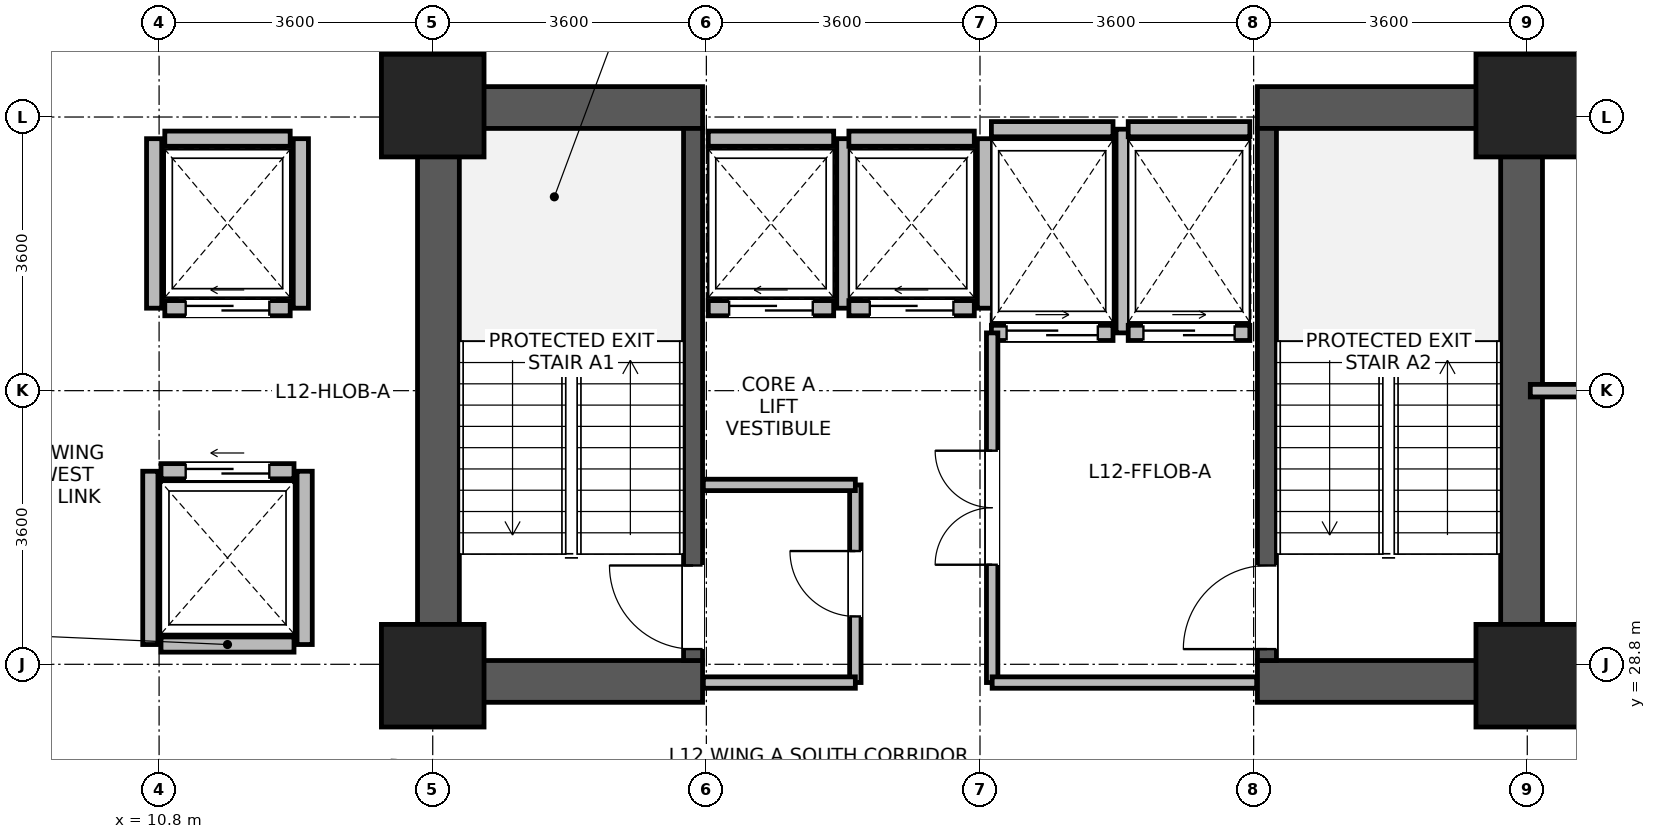
"""IFC4 building model, lengths in metres.
Left out: names, types, materials, properties, quantities, classifications, styles, units other than length and angle.
Written with IfcOpenShell. Run it as: python <this file> out.ifc"""

import sys

from ifc_helpers import new_model, si_unit, direction, frame, frame_2d, origin, origin_2d, place, context, subcontext, project, spatial, rectangle, extrude, source, transform, mapped, element, fill, save


model = new_model("IFC4")
c1 = context("Model", 3, precision=1e-05, world=origin(), true_north=direction((0.0, 1.0)))
c2 = subcontext(c1, "Body", "Model", "MODEL_VIEW")
j1 = project(units=[si_unit("LENGTHUNIT", "METRE"), si_unit("PLANEANGLEUNIT", "RADIAN")], contexts=[c1])
p1 = place(None, origin())
s1 = spatial("IfcSite", under=j1, at=p1, CompositionType="ELEMENT")
p2 = place(p1, origin())
s2 = spatial("IfcBuilding", under=s1, at=p2, CompositionType="ELEMENT")
p3 = place(p2, frame((0.0, 0.0, 51.2)))
s3 = spatial("IfcBuildingStorey", under=s2, at=p3, CompositionType="ELEMENT", Elevation=51.2)
for number, where, z_axis, x_axis in (
    (1, (14.475, 28.3, 0.0), (0.0, 0.0, 1.0), (0.0, 1.0, 0.0)),
    (2, (28.725, 28.3, 0.0), (0.0, 0.0, 1.0), (0.0, 1.0, 0.0)),
):
    element("IfcWall", number, at=place(p3, frame(where, z_axis=z_axis, x_axis=x_axis)), inside=s3, PredefinedType="SHEAR", context=c2, shape_type="SweptSolid", body=[
        extrude(rectangle(XDim=8.1, YDim=0.55, at=frame_2d((4.05, 0.0))), origin(), (0.0, 0.0, 1.0), 3.45),
    ])
for number, where, z_axis, x_axis in (
    (3, (14.75, 28.575, 0.0), (0.0, 0.0, 1.0), (1.0, 0.0, 0.0)),
    (4, (25.25, 28.575, 0.0), (0.0, 0.0, 1.0), (1.0, 0.0, 0.0)),
    (5, (14.75, 36.125, 0.0), (0.0, 0.0, 1.0), (1.0, 0.0, 0.0)),
    (6, (25.25, 36.125, 0.0), (0.0, 0.0, 1.0), (1.0, 0.0, 0.0)),
):
    element("IfcWall", number, at=place(p3, frame(where, z_axis=z_axis, x_axis=x_axis)), inside=s3, PredefinedType="SHEAR", context=c2, shape_type="SweptSolid", body=[
        extrude(rectangle(XDim=3.2, YDim=0.55, at=frame_2d((1.6, 0.0))), origin(), (0.0, 0.0, 1.0), 3.45),
    ])
p4 = place(p3, frame((17.825, 28.85, 0.0), z_axis=(0.0, 0.0, 1.0), x_axis=(0.0, 1.0, 0.0)))
e7 = element("IfcWall", 7, at=p4, inside=s3, PredefinedType="SHEAR", context=c2, shape_type="SweptSolid", body=[
    extrude(rectangle(XDim=7.0, YDim=0.25, at=frame_2d((3.5, 0.0))), origin(), (0.0, 0.0, 1.0), 3.45),
])
p5 = place(p4, frame((0.15, 0.0, 0.0)))
e8 = element("IfcOpeningElement", 8, at=p5, cuts=e7, PredefinedType="OPENING", context=c2, shape_type="SweptSolid", body=[
    extrude(rectangle(XDim=1.1, YDim=2.08, at=frame_2d((0.55, 1.04))), frame((0.0, 0.135, 0.0), z_axis=(0.0, -1.0, 0.0), x_axis=(1.0, 0.0, 0.0)), (0.0, 0.0, 1.0), 0.27),
])
p6 = place(p3, frame((25.375, 28.85, 0.0), z_axis=(0.0, 0.0, 1.0), x_axis=(0.0, 1.0, 0.0)))
e9 = element("IfcWall", 9, at=p6, inside=s3, PredefinedType="SHEAR", context=c2, shape_type="SweptSolid", body=[
    extrude(rectangle(XDim=7.0, YDim=0.25, at=frame_2d((3.5, 0.0))), origin(), (0.0, 0.0, 1.0), 3.45),
])
p7 = place(p6, frame((0.15, 0.0, 0.0)))
e10 = element("IfcOpeningElement", 10, at=p7, cuts=e9, PredefinedType="OPENING", context=c2, shape_type="SweptSolid", body=[
    extrude(rectangle(XDim=1.1, YDim=2.08, at=frame_2d((0.55, 1.04))), frame((0.0, 0.135, 0.0), z_axis=(0.0, -1.0, 0.0), x_axis=(1.0, 0.0, 0.0)), (0.0, 0.0, 1.0), 0.27),
])
m1 = source(origin(), c2, "Body", "SweptSolid", [
    extrude(rectangle(XDim=1.35, YDim=1.35, at=origin_2d()), origin(), (0.0, 0.0, 1.0), 3.7),
])
for number, where, z_axis, x_axis in (
    (11, (14.4, 28.65, 0.0), (0.0, 0.0, 1.0), (1.0, 0.0, 0.0)),
    (12, (14.4, 36.15, 0.0), (0.0, 0.0, 1.0), (1.0, 0.0, 0.0)),
    (13, (28.8, 28.65, 0.0), (0.0, 0.0, 1.0), (1.0, 0.0, 0.0)),
    (14, (28.8, 36.15, 0.0), (0.0, 0.0, 1.0), (1.0, 0.0, 0.0)),
):
    element("IfcColumn", number, at=place(p3, frame(where, z_axis=z_axis, x_axis=x_axis)), inside=s3, PredefinedType="COLUMN", context=c2, shape_type="MappedRepresentation", body=[
        mapped(m1, transform((0.0, 0.0, 0.0), x_axis=(1.0, 0.0, 0.0), y_axis=(0.0, 1.0, 0.0), z_axis=(0.0, 0.0, 1.0), scale=1.0)),
    ])
p8 = place(p3, frame((18.025, 33.485, 0.0), z_axis=(0.0, 0.0, 1.0), x_axis=(1.0, 0.0, 0.0)))
e15 = element("IfcWall", 15, at=p8, inside=s3, PredefinedType="PARTITIONING", context=c2, shape_type="SweptSolid", body=[
    extrude(rectangle(XDim=1.65, YDim=0.2, at=frame_2d((0.825, 0.0))), origin(), (0.0, 0.0, 1.0), 3.43),
])
p9 = place(p8, frame((0.275, 0.0, 0.0)))
e16 = element("IfcOpeningElement", 16, at=p9, cuts=e15, PredefinedType="OPENING", context=c2, shape_type="SweptSolid", body=[
    extrude(rectangle(XDim=1.1, YDim=2.12, at=frame_2d((0.55, 1.06))), frame((0.0, 0.11, 0.0), z_axis=(0.0, -1.0, 0.0), x_axis=(1.0, 0.0, 0.0)), (0.0, 0.0, 1.0), 0.22),
])
p10 = place(p3, frame((18.025, 35.715, 0.0), z_axis=(0.0, 0.0, 1.0), x_axis=(1.0, 0.0, 0.0)))
e17 = element("IfcWall", 17, at=p10, inside=s3, PredefinedType="PARTITIONING", context=c2, shape_type="SweptSolid", body=[
    extrude(rectangle(XDim=1.65, YDim=0.2, at=frame_2d((0.825, 0.0))), origin(), (0.0, 0.0, 1.0), 2.23),
])
p11 = place(p3, frame((19.815, 33.485, 0.0), z_axis=(0.0, 0.0, 1.0), x_axis=(0.0, 1.0, 0.0)))
e18 = element("IfcWall", 18, at=p11, inside=s3, PredefinedType="PARTITIONING", context=c2, shape_type="SweptSolid", body=[
    extrude(rectangle(XDim=2.23, YDim=0.2, at=frame_2d((1.115, 0.0))), origin(), (0.0, 0.0, 1.0), 3.43),
])
p12 = place(p3, frame((19.875, 33.485, 0.0), z_axis=(0.0, 0.0, 1.0), x_axis=(1.0, 0.0, 0.0)))
e19 = element("IfcWall", 19, at=p12, inside=s3, PredefinedType="PARTITIONING", context=c2, shape_type="SweptSolid", body=[
    extrude(rectangle(XDim=1.65, YDim=0.2, at=frame_2d((0.825, 0.0))), origin(), (0.0, 0.0, 1.0), 3.43),
])
p13 = place(p12, frame((0.275, 0.0, 0.0)))
e20 = element("IfcOpeningElement", 20, at=p13, cuts=e19, PredefinedType="OPENING", context=c2, shape_type="SweptSolid", body=[
    extrude(rectangle(XDim=1.1, YDim=2.12, at=frame_2d((0.55, 1.06))), frame((0.0, 0.11, 0.0), z_axis=(0.0, -1.0, 0.0), x_axis=(1.0, 0.0, 0.0)), (0.0, 0.0, 1.0), 0.22),
])
p14 = place(p3, frame((19.875, 35.715, 0.0), z_axis=(0.0, 0.0, 1.0), x_axis=(1.0, 0.0, 0.0)))
e21 = element("IfcWall", 21, at=p14, inside=s3, PredefinedType="PARTITIONING", context=c2, shape_type="SweptSolid", body=[
    extrude(rectangle(XDim=1.65, YDim=0.2, at=frame_2d((0.825, 0.0))), origin(), (0.0, 0.0, 1.0), 2.23),
])
p15 = place(p3, frame((21.665, 33.485, 0.0), z_axis=(0.0, 0.0, 1.0), x_axis=(0.0, 1.0, 0.0)))
e22 = element("IfcWall", 22, at=p15, inside=s3, PredefinedType="PARTITIONING", context=c2, shape_type="SweptSolid", body=[
    extrude(rectangle(XDim=2.23, YDim=0.2, at=frame_2d((1.115, 0.0))), origin(), (0.0, 0.0, 1.0), 3.43),
])
p16 = place(p3, frame((10.825, 29.06, 0.0), z_axis=(0.0, 0.0, 1.0), x_axis=(1.0, 0.0, 0.0)))
e23 = element("IfcWall", 23, at=p16, inside=s3, PredefinedType="PARTITIONING", context=c2, shape_type="SweptSolid", body=[
    extrude(rectangle(XDim=1.75, YDim=0.2, at=frame_2d((0.875, 0.0))), origin(), (0.0, 0.0, 1.0), 3.43),
])
p17 = place(p3, frame((10.825, 31.34, 0.0), z_axis=(0.0, 0.0, 1.0), x_axis=(1.0, 0.0, 0.0)))
e24 = element("IfcWall", 24, at=p17, inside=s3, PredefinedType="PARTITIONING", context=c2, shape_type="SweptSolid", body=[
    extrude(rectangle(XDim=1.75, YDim=0.2, at=frame_2d((0.875, 0.0))), origin(), (0.0, 0.0, 1.0), 3.43),
])
p18 = place(p17, frame((0.325, 0.0, 0.0)))
e25 = element("IfcOpeningElement", 25, at=p18, cuts=e24, PredefinedType="OPENING", context=c2, shape_type="SweptSolid", body=[
    extrude(rectangle(XDim=1.1, YDim=2.12, at=frame_2d((0.55, 1.06))), frame((0.0, 0.11, 0.0), z_axis=(0.0, -1.0, 0.0), x_axis=(1.0, 0.0, 0.0)), (0.0, 0.0, 1.0), 0.22),
])
for number, where, z_axis, x_axis in (
    (26, (10.685, 29.06, 0.0), (0.0, 0.0, 1.0), (0.0, 1.0, 0.0)),
    (27, (12.715, 29.06, 0.0), (0.0, 0.0, 1.0), (0.0, 1.0, 0.0)),
):
    element("IfcWall", number, at=place(p3, frame(where, z_axis=z_axis, x_axis=x_axis)), inside=s3, PredefinedType="PARTITIONING", context=c2, shape_type="SweptSolid", body=[
        extrude(rectangle(XDim=2.28, YDim=0.2, at=frame_2d((1.14, 0.0))), origin(), (0.0, 0.0, 1.0), 3.43),
    ])
p19 = place(p3, frame((10.875, 33.485, 0.0), z_axis=(0.0, 0.0, 1.0), x_axis=(1.0, 0.0, 0.0)))
e28 = element("IfcWall", 28, at=p19, inside=s3, PredefinedType="PARTITIONING", context=c2, shape_type="SweptSolid", body=[
    extrude(rectangle(XDim=1.65, YDim=0.2, at=frame_2d((0.825, 0.0))), origin(), (0.0, 0.0, 1.0), 3.43),
])
p20 = place(p19, frame((0.275, 0.0, 0.0)))
e29 = element("IfcOpeningElement", 29, at=p20, cuts=e28, PredefinedType="OPENING", context=c2, shape_type="SweptSolid", body=[
    extrude(rectangle(XDim=1.1, YDim=2.12, at=frame_2d((0.55, 1.06))), frame((0.0, 0.11, 0.0), z_axis=(0.0, -1.0, 0.0), x_axis=(1.0, 0.0, 0.0)), (0.0, 0.0, 1.0), 0.22),
])
p21 = place(p3, frame((10.875, 35.715, 0.0), z_axis=(0.0, 0.0, 1.0), x_axis=(1.0, 0.0, 0.0)))
e30 = element("IfcWall", 30, at=p21, inside=s3, PredefinedType="PARTITIONING", context=c2, shape_type="SweptSolid", body=[
    extrude(rectangle(XDim=1.65, YDim=0.2, at=frame_2d((0.825, 0.0))), origin(), (0.0, 0.0, 1.0), 3.43),
])
for number, where, z_axis, x_axis in (
    (31, (10.735, 33.485, 0.0), (0.0, 0.0, 1.0), (0.0, 1.0, 0.0)),
    (32, (12.665, 33.485, 0.0), (0.0, 0.0, 1.0), (0.0, 1.0, 0.0)),
):
    element("IfcWall", number, at=place(p3, frame(where, z_axis=z_axis, x_axis=x_axis)), inside=s3, PredefinedType="PARTITIONING", context=c2, shape_type="SweptSolid", body=[
        extrude(rectangle(XDim=2.23, YDim=0.2, at=frame_2d((1.115, 0.0))), origin(), (0.0, 0.0, 1.0), 3.43),
    ])
p22 = place(p3, frame((21.75, 33.16, 0.0), z_axis=(0.0, 0.0, 1.0), x_axis=(1.0, 0.0, 0.0)))
e33 = element("IfcWall", 33, at=p22, inside=s3, PredefinedType="PARTITIONING", context=c2, shape_type="SweptSolid", body=[
    extrude(rectangle(XDim=1.6, YDim=0.2, at=frame_2d((0.8, 0.0))), origin(), (0.0, 0.0, 1.0), 3.43),
])
p23 = place(p22, frame((0.2, 0.0, 0.0)))
e34 = element("IfcOpeningElement", 34, at=p23, cuts=e33, PredefinedType="OPENING", context=c2, shape_type="SweptSolid", body=[
    extrude(rectangle(XDim=1.2, YDim=2.12, at=frame_2d((0.6, 1.06))), frame((0.0, 0.11, 0.0), z_axis=(0.0, -1.0, 0.0), x_axis=(1.0, 0.0, 0.0)), (0.0, 0.0, 1.0), 0.22),
])
p24 = place(p3, frame((21.75, 35.84, 0.0), z_axis=(0.0, 0.0, 1.0), x_axis=(1.0, 0.0, 0.0)))
e35 = element("IfcWall", 35, at=p24, inside=s3, PredefinedType="PARTITIONING", context=c2, shape_type="SweptSolid", body=[
    extrude(rectangle(XDim=1.6, YDim=0.2, at=frame_2d((0.8, 0.0))), origin(), (0.0, 0.0, 1.0), 2.23),
])
p25 = place(p3, frame((23.49, 33.16, 0.0), z_axis=(0.0, 0.0, 1.0), x_axis=(0.0, 1.0, 0.0)))
e36 = element("IfcWall", 36, at=p25, inside=s3, PredefinedType="PARTITIONING", context=c2, shape_type="SweptSolid", body=[
    extrude(rectangle(XDim=2.68, YDim=0.2, at=frame_2d((1.34, 0.0))), origin(), (0.0, 0.0, 1.0), 3.43),
])
p26 = place(p3, frame((23.55, 33.16, 0.0), z_axis=(0.0, 0.0, 1.0), x_axis=(1.0, 0.0, 0.0)))
e37 = element("IfcWall", 37, at=p26, inside=s3, PredefinedType="PARTITIONING", context=c2, shape_type="SweptSolid", body=[
    extrude(rectangle(XDim=1.6, YDim=0.2, at=frame_2d((0.8, 0.0))), origin(), (0.0, 0.0, 1.0), 3.43),
])
p27 = place(p26, frame((0.2, 0.0, 0.0)))
e38 = element("IfcOpeningElement", 38, at=p27, cuts=e37, PredefinedType="OPENING", context=c2, shape_type="SweptSolid", body=[
    extrude(rectangle(XDim=1.2, YDim=2.12, at=frame_2d((0.6, 1.06))), frame((0.0, 0.11, 0.0), z_axis=(0.0, -1.0, 0.0), x_axis=(1.0, 0.0, 0.0)), (0.0, 0.0, 1.0), 0.22),
])
p28 = place(p3, frame((23.55, 35.84, 0.0), z_axis=(0.0, 0.0, 1.0), x_axis=(1.0, 0.0, 0.0)))
e39 = element("IfcWall", 39, at=p28, inside=s3, PredefinedType="PARTITIONING", context=c2, shape_type="SweptSolid", body=[
    extrude(rectangle(XDim=1.6, YDim=0.2, at=frame_2d((0.8, 0.0))), origin(), (0.0, 0.0, 1.0), 2.23),
])
p29 = place(p3, frame((19.96, 28.56, 0.0), z_axis=(0.0, 0.0, 1.0), x_axis=(0.0, 1.0, 0.0)))
e40 = element("IfcWall", 40, at=p29, inside=s3, PredefinedType="PARTITIONING", context=c2, shape_type="SweptSolid", body=[
    extrude(rectangle(XDim=2.6, YDim=0.15, at=frame_2d((1.3, 0.0))), origin(), (0.0, 0.0, 1.0), 3.43),
])
p30 = place(p29, frame((0.87, 0.0, 0.0)))
e41 = element("IfcOpeningElement", 41, at=p30, cuts=e40, PredefinedType="OPENING", context=c2, shape_type="SweptSolid", body=[
    extrude(rectangle(XDim=0.86, YDim=2.02, at=frame_2d((0.43, 1.01))), frame((0.0, 0.085, 0.0), z_axis=(0.0, -1.0, 0.0), x_axis=(1.0, 0.0, 0.0)), (0.0, 0.0, 1.0), 0.17),
])
p31 = place(p3, frame((17.96, 28.56, 0.0), z_axis=(0.0, 0.0, 1.0), x_axis=(1.0, 0.0, 0.0)))
e42 = element("IfcWall", 42, at=p31, inside=s3, PredefinedType="PARTITIONING", context=c2, shape_type="SweptSolid", body=[
    extrude(rectangle(XDim=2.0, YDim=0.15, at=frame_2d((1.0, 0.0))), origin(), (0.0, 0.0, 1.0), 2.23),
])
p32 = place(p3, frame((17.96, 31.16, 0.0), z_axis=(0.0, 0.0, 1.0), x_axis=(1.0, 0.0, 0.0)))
e43 = element("IfcWall", 43, at=p32, inside=s3, PredefinedType="PARTITIONING", context=c2, shape_type="SweptSolid", body=[
    extrude(rectangle(XDim=2.0, YDim=0.15, at=frame_2d((1.0, 0.0))), origin(), (0.0, 0.0, 1.0), 3.43),
])
p33 = place(p3, frame((21.76, 28.56, 0.0), z_axis=(0.0, 0.0, 1.0), x_axis=(0.0, 1.0, 0.0)))
e44 = element("IfcWall", 44, at=p33, inside=s3, PredefinedType="PARTITIONING", context=c2, shape_type="SweptSolid", body=[
    extrude(rectangle(XDim=4.6, YDim=0.15, at=frame_2d((2.3, 0.0))), origin(), (0.0, 0.0, 1.0), 3.43),
])
p34 = place(p33, frame((1.55, 0.0, 0.0)))
e45 = element("IfcOpeningElement", 45, at=p34, cuts=e44, PredefinedType="OPENING", context=c2, shape_type="SweptSolid", body=[
    extrude(rectangle(XDim=1.5, YDim=2.1, at=frame_2d((0.75, 1.05))), frame((0.0, 0.085, 0.0), z_axis=(0.0, -1.0, 0.0), x_axis=(1.0, 0.0, 0.0)), (0.0, 0.0, 1.0), 0.17),
])
p35 = place(p3, frame((28.84, 32.4, 0.0), z_axis=(0.0, 0.0, 1.0), x_axis=(1.0, 0.0, 0.0)))
e46 = element("IfcWall", 46, at=p35, inside=s3, PredefinedType="PARTITIONING", context=c2, shape_type="SweptSolid", body=[
    extrude(rectangle(XDim=4.52, YDim=0.165, at=frame_2d((2.26, 0.0))), origin(), (0.0, 0.0, 1.0), 3.43),
])
p36 = place(p3, frame((21.76, 28.56, 0.0), z_axis=(0.0, 0.0, 1.0), x_axis=(1.0, 0.0, 0.0)))
e47 = element("IfcWall", 47, at=p36, inside=s3, PredefinedType="PARTITIONING", context=c2, shape_type="SweptSolid", body=[
    extrude(rectangle(XDim=3.48, YDim=0.15, at=frame_2d((1.74, 0.0))), origin(), (0.0, 0.0, 1.0), 2.23),
])
p37 = place(p5, origin())
e48 = element("IfcDoor", 48, at=p37, inside=s3, OperationType="SINGLE_SWING_RIGHT", PredefinedType="DOOR", context=c2, shape_type="SweptSolid", body=[
    extrude(rectangle(XDim=1.1, YDim=2.08, at=frame_2d((0.55, 1.04))), frame((0.0, 0.025, 0.0), z_axis=(0.0, -1.0, 0.0), x_axis=(1.0, 0.0, 0.0)), (0.0, 0.0, 1.0), 0.05),
])
fill(e8, e48)
p38 = place(p7, origin())
e49 = element("IfcDoor", 49, at=p38, inside=s3, OperationType="SINGLE_SWING_LEFT", PredefinedType="DOOR", context=c2, shape_type="SweptSolid", body=[
    extrude(rectangle(XDim=1.1, YDim=2.08, at=frame_2d((0.55, 1.04))), frame((0.0, 0.025, 0.0), z_axis=(0.0, -1.0, 0.0), x_axis=(1.0, 0.0, 0.0)), (0.0, 0.0, 1.0), 0.05),
])
fill(e10, e49)
p39 = place(p9, origin())
e50 = element("IfcDoor", 50, at=p39, inside=s3, OperationType="SLIDING_TO_LEFT", PredefinedType="DOOR", context=c2, shape_type="SweptSolid", body=[
    extrude(rectangle(XDim=1.1, YDim=2.12, at=frame_2d((0.55, 1.06))), frame((0.0, 0.025, 0.0), z_axis=(0.0, -1.0, 0.0), x_axis=(1.0, 0.0, 0.0)), (0.0, 0.0, 1.0), 0.05),
])
fill(e16, e50)
p40 = place(p13, origin())
e51 = element("IfcDoor", 51, at=p40, inside=s3, OperationType="SLIDING_TO_LEFT", PredefinedType="DOOR", context=c2, shape_type="SweptSolid", body=[
    extrude(rectangle(XDim=1.1, YDim=2.12, at=frame_2d((0.55, 1.06))), frame((0.0, 0.025, 0.0), z_axis=(0.0, -1.0, 0.0), x_axis=(1.0, 0.0, 0.0)), (0.0, 0.0, 1.0), 0.05),
])
fill(e20, e51)
p41 = place(p18, origin())
e52 = element("IfcDoor", 52, at=p41, inside=s3, OperationType="SLIDING_TO_LEFT", PredefinedType="DOOR", context=c2, shape_type="SweptSolid", body=[
    extrude(rectangle(XDim=1.1, YDim=2.12, at=frame_2d((0.55, 1.06))), frame((0.0, 0.025, 0.0), z_axis=(0.0, -1.0, 0.0), x_axis=(1.0, 0.0, 0.0)), (0.0, 0.0, 1.0), 0.05),
])
fill(e25, e52)
p42 = place(p20, origin())
e53 = element("IfcDoor", 53, at=p42, inside=s3, OperationType="SLIDING_TO_LEFT", PredefinedType="DOOR", context=c2, shape_type="SweptSolid", body=[
    extrude(rectangle(XDim=1.1, YDim=2.12, at=frame_2d((0.55, 1.06))), frame((0.0, 0.025, 0.0), z_axis=(0.0, -1.0, 0.0), x_axis=(1.0, 0.0, 0.0)), (0.0, 0.0, 1.0), 0.05),
])
fill(e29, e53)
p43 = place(p23, origin())
e54 = element("IfcDoor", 54, at=p43, inside=s3, OperationType="SLIDING_TO_RIGHT", PredefinedType="DOOR", context=c2, shape_type="SweptSolid", body=[
    extrude(rectangle(XDim=1.2, YDim=2.12, at=frame_2d((0.6, 1.06))), frame((0.0, 0.025, 0.0), z_axis=(0.0, -1.0, 0.0), x_axis=(1.0, 0.0, 0.0)), (0.0, 0.0, 1.0), 0.05),
])
fill(e34, e54)
p44 = place(p27, origin())
e55 = element("IfcDoor", 55, at=p44, inside=s3, OperationType="SLIDING_TO_RIGHT", PredefinedType="DOOR", context=c2, shape_type="SweptSolid", body=[
    extrude(rectangle(XDim=1.2, YDim=2.12, at=frame_2d((0.6, 1.06))), frame((0.0, 0.025, 0.0), z_axis=(0.0, -1.0, 0.0), x_axis=(1.0, 0.0, 0.0)), (0.0, 0.0, 1.0), 0.05),
])
fill(e38, e55)
p45 = place(p30, origin())
e56 = element("IfcDoor", 56, at=p45, inside=s3, OperationType="SINGLE_SWING_RIGHT", PredefinedType="DOOR", context=c2, shape_type="SweptSolid", body=[
    extrude(rectangle(XDim=0.86, YDim=2.02, at=frame_2d((0.43, 1.01))), frame((0.0, 0.025, 0.0), z_axis=(0.0, -1.0, 0.0), x_axis=(1.0, 0.0, 0.0)), (0.0, 0.0, 1.0), 0.05),
])
fill(e41, e56)
p46 = place(p34, origin())
e57 = element("IfcDoor", 57, at=p46, inside=s3, OperationType="DOUBLE_DOOR_SINGLE_SWING", PredefinedType="DOOR", context=c2, shape_type="SweptSolid", body=[
    extrude(rectangle(XDim=1.5, YDim=2.1, at=frame_2d((0.75, 1.05))), frame((0.0, 0.025, 0.0), z_axis=(0.0, -1.0, 0.0), x_axis=(1.0, 0.0, 0.0)), (0.0, 0.0, 1.0), 0.05),
])
fill(e45, e57)
save(model, sys.argv[1])
